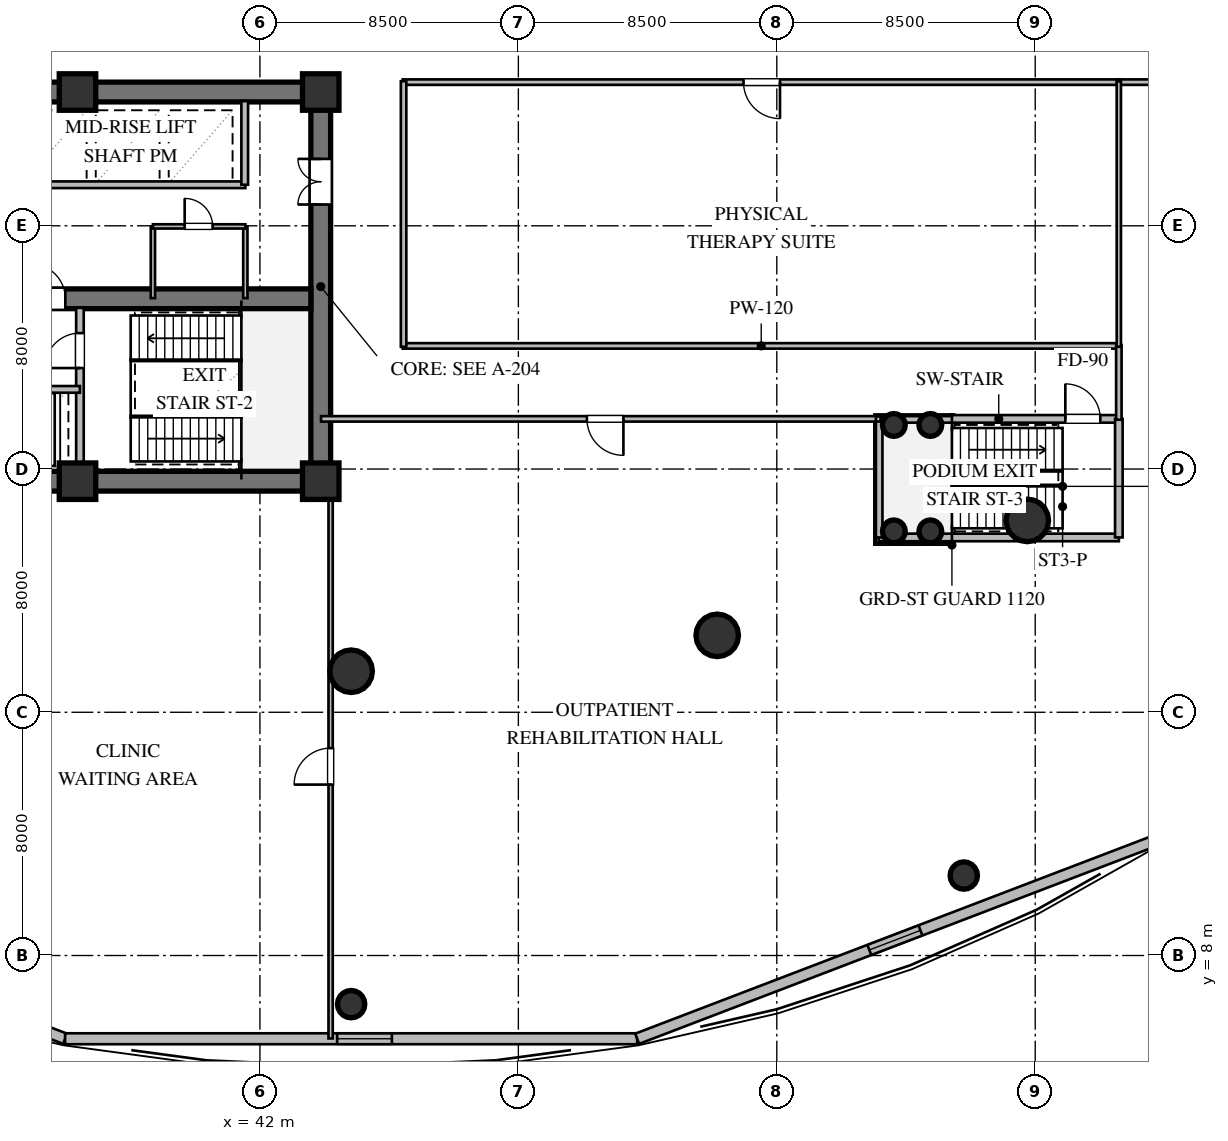
"""IFC4 building model, lengths in metres.
Left out: names, types, materials, properties, quantities, classifications, styles, units other than length and angle.
Written with IfcOpenShell. Run it as: python <this file> out.ifc"""

import sys

from ifc_helpers import new_model, si_unit, direction, frame, frame_2d, origin, origin_2d, place, context, subcontext, project, spatial, rectangle, circle, extrude, element, fill, save


model = new_model("IFC4")
c1 = context("Model", 3, precision=1e-05, world=origin(), true_north=direction((0.0, 1.0)))
c2 = subcontext(c1, "Body", "Model", "MODEL_VIEW")
j1 = project(units=[si_unit("LENGTHUNIT", "METRE"), si_unit("PLANEANGLEUNIT", "RADIAN")], contexts=[c1])
p1 = place(None, origin())
s1 = spatial("IfcSite", under=j1, at=p1, CompositionType="ELEMENT")
p2 = place(p1, origin())
s2 = spatial("IfcBuilding", under=s1, at=p2, CompositionType="ELEMENT")
p3 = place(p2, frame((0.0, 0.0, 14.4)))
s3 = spatial("IfcBuildingStorey", under=s2, at=p3, CompositionType="ELEMENT", Elevation=14.4)
for number, where, z_axis, x_axis in (
    (1, (21.675, 23.6, 0.0), (0.0, 0.0, 1.0), (1.0, 0.0, 0.0)),
    (2, (21.675, 36.4, 0.0), (0.0, 0.0, 1.0), (1.0, 0.0, 0.0)),
):
    element("IfcWall", number, at=place(p3, frame(where, z_axis=z_axis, x_axis=x_axis)), inside=s3, PredefinedType="SHEAR", context=c2, shape_type="SweptSolid", body=[
        extrude(rectangle(XDim=22.65, YDim=0.65, at=frame_2d((11.325, 0.0))), origin(), (0.0, 0.0, 1.0), 4.52),
    ])
p4 = place(p3, frame((44.0, 23.925, 0.0), z_axis=(0.0, 0.0, 1.0), x_axis=(0.0, 1.0, 0.0)))
e3 = element("IfcWall", 3, at=p4, inside=s3, PredefinedType="SHEAR", context=c2, shape_type="SweptSolid", body=[
    extrude(rectangle(XDim=12.15, YDim=0.65, at=frame_2d((6.075, 0.0))), origin(), (0.0, 0.0, 1.0), 4.52),
])
p5 = place(p4, frame((8.775, 0.0, 0.0)))
e4 = element("IfcOpeningElement", 4, at=p5, cuts=e3, PredefinedType="OPENING", context=c2, shape_type="SweptSolid", body=[
    extrude(rectangle(XDim=1.5, YDim=2.15, at=frame_2d((0.75, 1.075))), frame((0.0, 0.335, 0.0), z_axis=(0.0, -1.0, 0.0), x_axis=(1.0, 0.0, 0.0)), (0.0, 0.0, 1.0), 0.67),
])
p6 = place(p3, frame((22.325, 29.6, 0.0), z_axis=(0.0, 0.0, 1.0), x_axis=(1.0, 0.0, 0.0)))
e5 = element("IfcWall", 5, at=p6, inside=s3, PredefinedType="SHEAR", context=c2, shape_type="SweptSolid", body=[
    extrude(rectangle(XDim=21.35, YDim=0.65, at=frame_2d((10.675, 0.0))), origin(), (0.0, 0.0, 1.0), 4.52),
])
p7 = place(p6, frame((12.125, 0.0, 0.0)))
e6 = element("IfcOpeningElement", 6, at=p7, cuts=e5, PredefinedType="OPENING", context=c2, shape_type="SweptSolid", body=[
    extrude(rectangle(XDim=1.15, YDim=2.1, at=frame_2d((0.575, 1.05))), frame((0.0, 0.335, 0.0), z_axis=(0.0, -1.0, 0.0), x_axis=(1.0, 0.0, 0.0)), (0.0, 0.0, 1.0), 0.67),
])
for number, where, z_axis, x_axis in (
    (7, (36.0, 23.6, 0.0), (0.0, 0.0, 1.0), (1.0, 0.0, 0.0)),
    (8, (44.0, 23.6, 0.0), (0.0, 0.0, 1.0), (1.0, 0.0, 0.0)),
    (9, (44.0, 36.4, 0.0), (0.0, 0.0, 1.0), (1.0, 0.0, 0.0)),
    (10, (36.0, 36.4, 0.0), (0.0, 0.0, 1.0), (1.0, 0.0, 0.0)),
):
    element("IfcColumn", number, at=place(p3, frame(where, z_axis=z_axis, x_axis=x_axis)), inside=s3, PredefinedType="COLUMN", context=c2, shape_type="SweptSolid", body=[
        extrude(rectangle(XDim=1.2, YDim=1.2, at=origin_2d()), origin(), (0.0, 0.0, 1.0), 4.8),
    ])
for number, where, z_axis, x_axis in (
    (11, (45.0, 17.35, 0.0), (0.0, 0.0, 1.0), (1.0, 0.0, 0.0)),
    (12, (57.04, 18.53, 0.0), (0.0, 0.0, 1.0), (1.0, 0.0, 0.0)),
    (13, (67.24, 22.31, 0.0), (0.0, 0.0, 1.0), (1.0, 0.0, 0.0)),
):
    element("IfcColumn", number, at=place(p3, frame(where, z_axis=z_axis, x_axis=x_axis)), inside=s3, PredefinedType="COLUMN", context=c2, shape_type="SweptSolid", body=[
        extrude(circle(Radius=0.7, at=origin_2d()), origin(), (0.0, 0.0, 1.0), 4.8),
    ])
for number, where, z_axis, x_axis in (
    (14, (45.0, 6.4, 0.0), (0.0, 0.0, 1.0), (1.0, 0.0, 0.0)),
    (15, (65.15, 10.63, 0.0), (0.0, 0.0, 1.0), (1.0, 0.0, 0.0)),
):
    element("IfcColumn", number, at=place(p3, frame(where, z_axis=z_axis, x_axis=x_axis)), inside=s3, PredefinedType="COLUMN", context=c2, shape_type="SweptSolid", body=[
        extrude(circle(Radius=0.45, at=origin_2d()), origin(), (0.0, 0.0, 1.0), 4.8),
    ])
for number, where, z_axis, x_axis in (
    (16, (62.85, 21.95, 0.0), (0.0, 0.0, 1.0), (1.0, 0.0, 0.0)),
    (17, (62.85, 25.45, 0.0), (0.0, 0.0, 1.0), (1.0, 0.0, 0.0)),
    (18, (64.05, 21.95, 0.0), (0.0, 0.0, 1.0), (1.0, 0.0, 0.0)),
    (19, (64.05, 25.45, 0.0), (0.0, 0.0, 1.0), (1.0, 0.0, 0.0)),
):
    element("IfcColumn", number, at=place(p3, frame(where, z_axis=z_axis, x_axis=x_axis)), inside=s3, PredefinedType="COLUMN", context=c2, shape_type="SweptSolid", body=[
        extrude(circle(Radius=0.375, at=origin_2d()), origin(), (0.0, 0.0, 1.0), 4.8),
    ])
p8 = place(p3, frame((18.396, 11.839, 0.0), z_axis=(0.0, 0.0, 1.0), x_axis=(0.934012147289, -0.357241247221, 0.0)))
e20 = element("IfcWall", 20, at=p8, inside=s3, PredefinedType="STANDARD", context=c2, shape_type="SweptSolid", body=[
    extrude(rectangle(XDim=18.411, YDim=0.36, at=frame_2d((9.206, 0.0))), origin(), (0.0, 0.0, 1.0), 4.52),
])
p9 = place(p8, frame((8.305, 0.0, 1.05)))
e21 = element("IfcOpeningElement", 21, at=p9, cuts=e20, PredefinedType="OPENING", context=c2, shape_type="SweptSolid", body=[
    extrude(rectangle(XDim=1.8, YDim=1.7, at=frame_2d((0.9, 0.85))), frame((0.0, 0.19, 0.0), z_axis=(0.0, -1.0, 0.0), x_axis=(1.0, 0.0, 0.0)), (0.0, 0.0, 1.0), 0.38),
])
p10 = place(p3, frame((35.592, 5.262, 0.0), z_axis=(0.0, 0.0, 1.0), x_axis=(1.0, 0.0, 0.0)))
e22 = element("IfcWall", 22, at=p10, inside=s3, PredefinedType="STANDARD", context=c2, shape_type="SweptSolid", body=[
    extrude(rectangle(XDim=18.816, YDim=0.36, at=frame_2d((9.408, 0.0))), origin(), (0.0, 0.0, 1.0), 4.52),
])
p11 = place(p10, frame((8.948, 0.0, 1.05)))
e23 = element("IfcOpeningElement", 23, at=p11, cuts=e22, PredefinedType="OPENING", context=c2, shape_type="SweptSolid", body=[
    extrude(rectangle(XDim=1.8, YDim=1.7, at=frame_2d((0.9, 0.85))), frame((0.0, 0.19, 0.0), z_axis=(0.0, -1.0, 0.0), x_axis=(1.0, 0.0, 0.0)), (0.0, 0.0, 1.0), 0.38),
])
p12 = place(p3, frame((54.408, 5.262, 0.0), z_axis=(0.0, 0.0, 1.0), x_axis=(0.934014086565, 0.357236176917, 0.0)))
e24 = element("IfcWall", 24, at=p12, inside=s3, PredefinedType="STANDARD", context=c2, shape_type="SweptSolid", body=[
    extrude(rectangle(XDim=18.151, YDim=0.36, at=frame_2d((9.075, 0.0))), origin(), (0.0, 0.0, 1.0), 4.52),
])
p13 = place(p12, frame((8.175, 0.0, 1.05)))
e25 = element("IfcOpeningElement", 25, at=p13, cuts=e24, PredefinedType="OPENING", context=c2, shape_type="SweptSolid", body=[
    extrude(rectangle(XDim=1.8, YDim=1.7, at=frame_2d((0.9, 0.85))), frame((0.0, 0.19, 0.0), z_axis=(0.0, -1.0, 0.0), x_axis=(1.0, 0.0, 0.0)), (0.0, 0.0, 1.0), 0.38),
])
p14 = place(p3, frame((36.08, 23.9, 0.0), z_axis=(0.0, 0.0, 1.0), x_axis=(0.0, 1.0, 0.0)))
e26 = element("IfcWall", 26, at=p14, inside=s3, PredefinedType="SOLIDWALL", context=c2, shape_type="SweptSolid", body=[
    extrude(rectangle(XDim=5.4, YDim=0.25, at=frame_2d((2.7, 0.0))), origin(), (0.0, 0.0, 1.0), 4.52),
])
p15 = place(p14, frame((3.421, 0.0, 0.0)))
e27 = element("IfcOpeningElement", 27, at=p15, cuts=e26, PredefinedType="OPENING", context=c2, shape_type="SweptSolid", body=[
    extrude(rectangle(XDim=1.15, YDim=2.1, at=frame_2d((0.575, 1.05))), frame((0.0, 0.135, 0.0), z_axis=(0.0, -1.0, 0.0), x_axis=(1.0, 0.0, 0.0)), (0.0, 0.0, 1.0), 0.27),
])
p16 = place(p3, frame((29.92, 26.62, 0.0), z_axis=(0.0, 0.0, 1.0), x_axis=(1.0, 0.0, 0.0)))
e28 = element("IfcWall", 28, at=p16, inside=s3, PredefinedType="SOLIDWALL", context=c2, shape_type="SweptSolid", body=[
    extrude(rectangle(XDim=6.16, YDim=0.22, at=frame_2d((3.08, 0.0))), origin(), (0.0, 0.0, 1.0), 4.52),
])
p17 = place(p16, frame((0.99, 0.0, 0.0)))
e29 = element("IfcOpeningElement", 29, at=p17, cuts=e28, PredefinedType="OPENING", context=c2, shape_type="SweptSolid", body=[
    extrude(rectangle(XDim=1.1, YDim=2.1, at=frame_2d((0.55, 1.05))), frame((0.0, 0.12, 0.0), z_axis=(0.0, -1.0, 0.0), x_axis=(1.0, 0.0, 0.0)), (0.0, 0.0, 1.0), 0.24),
])
p18 = place(p16, frame((4.07, 0.0, 0.0)))
e30 = element("IfcOpeningElement", 30, at=p18, cuts=e28, PredefinedType="OPENING", context=c2, shape_type="SweptSolid", body=[
    extrude(rectangle(XDim=1.1, YDim=2.1, at=frame_2d((0.55, 1.05))), frame((0.0, 0.12, 0.0), z_axis=(0.0, -1.0, 0.0), x_axis=(1.0, 0.0, 0.0)), (0.0, 0.0, 1.0), 0.24),
])
p19 = place(p3, frame((33.98, 33.35, 0.0), z_axis=(0.0, 0.0, 1.0), x_axis=(1.0, 0.0, 0.0)))
e31 = element("IfcWall", 31, at=p19, inside=s3, PredefinedType="SOLIDWALL", context=c2, shape_type="SweptSolid", body=[
    extrude(rectangle(XDim=7.54, YDim=0.22, at=frame_2d((3.77, 0.0))), origin(), (0.0, 0.0, 1.0), 4.52),
])
p20 = place(p3, frame((41.5, 33.35, 0.0), z_axis=(0.0, 0.0, 1.0), x_axis=(0.0, 1.0, 0.0)))
e32 = element("IfcWall", 32, at=p20, inside=s3, PredefinedType="SOLIDWALL", context=c2, shape_type="SweptSolid", body=[
    extrude(rectangle(XDim=2.75, YDim=0.22, at=frame_2d((1.375, 0.0))), origin(), (0.0, 0.0, 1.0), 4.52),
])
p21 = place(p3, frame((38.48, 29.62, 0.0), z_axis=(0.0, 0.0, 1.0), x_axis=(0.0, 1.0, 0.0)))
e33 = element("IfcWall", 33, at=p21, inside=s3, PredefinedType="PARTITIONING", context=c2, shape_type="SweptSolid", body=[
    extrude(rectangle(XDim=2.36, YDim=0.14, at=frame_2d((1.18, 0.0))), origin(), (0.0, 0.0, 1.0), 4.52),
])
p22 = place(p3, frame((41.52, 29.62, 0.0), z_axis=(0.0, 0.0, 1.0), x_axis=(0.0, 1.0, 0.0)))
e34 = element("IfcWall", 34, at=p22, inside=s3, PredefinedType="PARTITIONING", context=c2, shape_type="SweptSolid", body=[
    extrude(rectangle(XDim=2.36, YDim=0.14, at=frame_2d((1.18, 0.0))), origin(), (0.0, 0.0, 1.0), 1.887),
])
p23 = place(p3, frame((38.48, 31.98, 0.0), z_axis=(0.0, 0.0, 1.0), x_axis=(1.0, 0.0, 0.0)))
e35 = element("IfcWall", 35, at=p23, inside=s3, PredefinedType="PARTITIONING", context=c2, shape_type="SweptSolid", body=[
    extrude(rectangle(XDim=3.04, YDim=0.14, at=frame_2d((1.52, 0.0))), origin(), (0.0, 0.0, 1.0), 4.52),
])
p24 = place(p23, frame((1.045, 0.0, 0.0)))
e36 = element("IfcOpeningElement", 36, at=p24, cuts=e35, PredefinedType="OPENING", context=c2, shape_type="SweptSolid", body=[
    extrude(rectangle(XDim=0.92, YDim=2.1, at=frame_2d((0.46, 1.05))), frame((0.0, 0.08, 0.0), z_axis=(0.0, -1.0, 0.0), x_axis=(1.0, 0.0, 0.0)), (0.0, 0.0, 1.0), 0.16),
])
p25 = place(p3, frame((62.35, 25.65, 0.0), z_axis=(0.0, 0.0, 1.0), x_axis=(1.0, 0.0, 0.0)))
e37 = element("IfcWall", 37, at=p25, inside=s3, PredefinedType="SOLIDWALL", context=c2, shape_type="SweptSolid", body=[
    extrude(rectangle(XDim=7.9, YDim=0.25, at=frame_2d((3.95, 0.0))), origin(), (0.0, 0.0, 1.0), 4.52),
])
p26 = place(p25, frame((6.14, 0.0, 0.0)))
e38 = element("IfcOpeningElement", 38, at=p26, cuts=e37, PredefinedType="OPENING", context=c2, shape_type="SweptSolid", body=[
    extrude(rectangle(XDim=1.15, YDim=2.1, at=frame_2d((0.575, 1.05))), frame((0.0, 0.135, 0.0), z_axis=(0.0, -1.0, 0.0), x_axis=(1.0, 0.0, 0.0)), (0.0, 0.0, 1.0), 0.27),
])
p27 = place(p3, frame((62.35, 21.75, 0.0), z_axis=(0.0, 0.0, 1.0), x_axis=(1.0, 0.0, 0.0)))
e39 = element("IfcWall", 39, at=p27, inside=s3, PredefinedType="SOLIDWALL", context=c2, shape_type="SweptSolid", body=[
    extrude(rectangle(XDim=7.9, YDim=0.25, at=frame_2d((3.95, 0.0))), origin(), (0.0, 0.0, 1.0), 4.52),
])
p28 = place(p3, frame((62.35, 21.75, 0.0), z_axis=(0.0, 0.0, 1.0), x_axis=(0.0, 1.0, 0.0)))
e40 = element("IfcWall", 40, at=p28, inside=s3, PredefinedType="SOLIDWALL", context=c2, shape_type="SweptSolid", body=[
    extrude(rectangle(XDim=3.9, YDim=0.25, at=frame_2d((1.95, 0.0))), origin(), (0.0, 0.0, 1.0), 1.887),
])
p29 = place(p3, frame((70.25, 21.75, 0.0), z_axis=(0.0, 0.0, 1.0), x_axis=(0.0, 1.0, 0.0)))
e41 = element("IfcWall", 41, at=p29, inside=s3, PredefinedType="SOLIDWALL", context=c2, shape_type="SweptSolid", body=[
    extrude(rectangle(XDim=3.9, YDim=0.25, at=frame_2d((1.95, 0.0))), origin(), (0.0, 0.0, 1.0), 4.52),
])
p30 = place(p3, frame((62.415, 25.65, 0.0), z_axis=(0.0, 0.0, 1.0), x_axis=(-1.0, 0.0, 0.0)))
e42 = element("IfcWall", 42, at=p30, inside=s3, PredefinedType="PARTITIONING", context=c2, shape_type="SweptSolid", body=[
    extrude(rectangle(XDim=18.405, YDim=0.18, at=frame_2d((9.203, 0.0))), origin(), (0.0, 0.0, 1.0), 4.05),
])
p31 = place(p30, frame((8.46, 0.0, 0.0)))
e43 = element("IfcOpeningElement", 43, at=p31, cuts=e42, PredefinedType="OPENING", context=c2, shape_type="SweptSolid", body=[
    extrude(rectangle(XDim=1.2, YDim=2.15, at=frame_2d((0.6, 1.075))), frame((0.0, 0.1, 0.0), z_axis=(0.0, -1.0, 0.0), x_axis=(1.0, 0.0, 0.0)), (0.0, 0.0, 1.0), 0.2),
])
p32 = place(p3, frame((70.315, 36.725, 0.0), z_axis=(0.0, 0.0, 1.0), x_axis=(-1.0, 0.0, 0.0)))
e44 = element("IfcWall", 44, at=p32, inside=s3, PredefinedType="PARTITIONING", context=c2, shape_type="SweptSolid", body=[
    extrude(rectangle(XDim=23.62, YDim=0.18, at=frame_2d((11.81, 0.0))), origin(), (0.0, 0.0, 1.0), 4.05),
])
p33 = place(p32, frame((11.21, 0.0, 0.0)))
e45 = element("IfcOpeningElement", 45, at=p33, cuts=e44, PredefinedType="OPENING", context=c2, shape_type="SweptSolid", body=[
    extrude(rectangle(XDim=1.2, YDim=2.15, at=frame_2d((0.6, 1.075))), frame((0.0, 0.1, 0.0), z_axis=(0.0, -1.0, 0.0), x_axis=(1.0, 0.0, 0.0)), (0.0, 0.0, 1.0), 0.2),
])
p34 = place(p3, frame((46.695, 28.05, 0.0), z_axis=(0.0, 0.0, 1.0), x_axis=(1.0, 0.0, 0.0)))
e46 = element("IfcWall", 46, at=p34, inside=s3, PredefinedType="PARTITIONING", context=c2, shape_type="SweptSolid", body=[
    extrude(rectangle(XDim=23.585, YDim=0.18, at=frame_2d((11.792, 0.0))), origin(), (0.0, 0.0, 1.0), 4.05),
])
p35 = place(p3, frame((46.725, 36.755, 0.0), z_axis=(0.0, 0.0, 1.0), x_axis=(0.0, -1.0, 0.0)))
e47 = element("IfcWall", 47, at=p35, inside=s3, PredefinedType="PARTITIONING", context=c2, shape_type="SweptSolid", body=[
    extrude(rectangle(XDim=8.735, YDim=0.18, at=frame_2d((4.367, 0.0))), origin(), (0.0, 0.0, 1.0), 4.52),
])
p36 = place(p3, frame((78.03, 36.725, 0.0), z_axis=(0.0, 0.0, 1.0), x_axis=(-1.0, 0.0, 0.0)))
e48 = element("IfcWall", 48, at=p36, inside=s3, PredefinedType="PARTITIONING", context=c2, shape_type="SweptSolid", body=[
    extrude(rectangle(XDim=7.845, YDim=0.18, at=frame_2d((3.922, 0.0))), origin(), (0.0, 0.0, 1.0), 4.52),
])
p37 = place(p36, frame((3.322, 0.0, 0.0)))
e49 = element("IfcOpeningElement", 49, at=p37, cuts=e48, PredefinedType="OPENING", context=c2, shape_type="SweptSolid", body=[
    extrude(rectangle(XDim=1.2, YDim=2.15, at=frame_2d((0.6, 1.075))), frame((0.0, 0.1, 0.0), z_axis=(0.0, -1.0, 0.0), x_axis=(1.0, 0.0, 0.0)), (0.0, 0.0, 1.0), 0.2),
])
p38 = place(p3, frame((70.25, 28.08, 0.0), z_axis=(0.0, 0.0, 1.0), x_axis=(0.0, -1.0, 0.0)))
e50 = element("IfcWall", 50, at=p38, inside=s3, PredefinedType="PARTITIONING", context=c2, shape_type="SweptSolid", body=[
    extrude(rectangle(XDim=2.46, YDim=0.18, at=frame_2d((1.23, 0.0))), origin(), (0.0, 0.0, 1.0), 4.52),
])
p39 = place(p3, frame((44.325, 5.272, 0.0), z_axis=(0.0, 0.0, 1.0), x_axis=(0.0, 1.0, 0.0)))
e51 = element("IfcWall", 51, at=p39, inside=s3, PredefinedType="PARTITIONING", context=c2, shape_type="SweptSolid", body=[
    extrude(rectangle(XDim=18.318, YDim=0.14, at=frame_2d((9.159, 0.0))), origin(), (0.0, 0.0, 1.0), 3.66),
])
p40 = place(p39, frame((8.349, 0.0, 0.0)))
e52 = element("IfcOpeningElement", 52, at=p40, cuts=e51, PredefinedType="OPENING", context=c2, shape_type="SweptSolid", body=[
    extrude(rectangle(XDim=1.2, YDim=2.15, at=frame_2d((0.6, 1.075))), frame((0.0, 0.08, 0.0), z_axis=(0.0, -1.0, 0.0), x_axis=(1.0, 0.0, 0.0)), (0.0, 0.0, 1.0), 0.16),
])
p41 = place(p3, frame((70.25, 36.755, 0.0), z_axis=(0.0, 0.0, 1.0), x_axis=(0.0, -1.0, 0.0)))
e53 = element("IfcWall", 53, at=p41, inside=s3, PredefinedType="PARTITIONING", context=c2, shape_type="SweptSolid", body=[
    extrude(rectangle(XDim=8.735, YDim=0.14, at=frame_2d((4.367, 0.0))), origin(), (0.0, 0.0, 1.0), 4.52),
])
p42 = place(p11, origin())
e54 = element("IfcWindow", 54, at=p42, inside=s3, PartitioningType="SINGLE_PANEL", PredefinedType="WINDOW", context=c2, shape_type="SweptSolid", body=[
    extrude(rectangle(XDim=1.8, YDim=1.7, at=frame_2d((0.9, 0.85))), frame((0.0, 0.03, 0.0), z_axis=(0.0, -1.0, 0.0), x_axis=(1.0, 0.0, 0.0)), (0.0, 0.0, 1.0), 0.06),
])
fill(e23, e54)
p43 = place(p13, origin())
e55 = element("IfcWindow", 55, at=p43, inside=s3, PartitioningType="SINGLE_PANEL", PredefinedType="WINDOW", context=c2, shape_type="SweptSolid", body=[
    extrude(rectangle(XDim=1.8, YDim=1.7, at=frame_2d((0.9, 0.85))), frame((0.0, 0.03, 0.0), z_axis=(0.0, -1.0, 0.0), x_axis=(1.0, 0.0, 0.0)), (0.0, 0.0, 1.0), 0.06),
])
fill(e25, e55)
p44 = place(p15, origin())
e56 = element("IfcDoor", 56, at=p44, inside=s3, OperationType="SINGLE_SWING_LEFT", PredefinedType="DOOR", context=c2, shape_type="SweptSolid", body=[
    extrude(rectangle(XDim=1.15, YDim=2.1, at=frame_2d((0.575, 1.05))), frame((0.0, 0.025, 0.0), z_axis=(0.0, -1.0, 0.0), x_axis=(1.0, 0.0, 0.0)), (0.0, 0.0, 1.0), 0.05),
])
fill(e27, e56)
p45 = place(p7, origin())
e57 = element("IfcDoor", 57, at=p45, inside=s3, OperationType="SINGLE_SWING_LEFT", PredefinedType="DOOR", context=c2, shape_type="SweptSolid", body=[
    extrude(rectangle(XDim=1.15, YDim=2.1, at=frame_2d((0.575, 1.05))), frame((0.0, 0.025, 0.0), z_axis=(0.0, -1.0, 0.0), x_axis=(1.0, 0.0, 0.0)), (0.0, 0.0, 1.0), 0.05),
])
fill(e6, e57)
p46 = place(p5, origin())
e58 = element("IfcDoor", 58, at=p46, inside=s3, OperationType="DOUBLE_DOOR_SINGLE_SWING", PredefinedType="DOOR", context=c2, shape_type="SweptSolid", body=[
    extrude(rectangle(XDim=1.5, YDim=2.15, at=frame_2d((0.75, 1.075))), frame((0.0, 0.025, 0.0), z_axis=(0.0, -1.0, 0.0), x_axis=(1.0, 0.0, 0.0)), (0.0, 0.0, 1.0), 0.05),
])
fill(e4, e58)
p47 = place(p24, origin())
e59 = element("IfcDoor", 59, at=p47, inside=s3, OperationType="SINGLE_SWING_LEFT", PredefinedType="DOOR", context=c2, shape_type="SweptSolid", body=[
    extrude(rectangle(XDim=0.92, YDim=2.1, at=frame_2d((0.46, 1.05))), frame((0.0, 0.025, 0.0), z_axis=(0.0, -1.0, 0.0), x_axis=(1.0, 0.0, 0.0)), (0.0, 0.0, 1.0), 0.05),
])
fill(e36, e59)
p48 = place(p26, origin())
e60 = element("IfcDoor", 60, at=p48, inside=s3, OperationType="SINGLE_SWING_LEFT", PredefinedType="DOOR", context=c2, shape_type="SweptSolid", body=[
    extrude(rectangle(XDim=1.15, YDim=2.1, at=frame_2d((0.575, 1.05))), frame((0.0, 0.025, 0.0), z_axis=(0.0, -1.0, 0.0), x_axis=(1.0, 0.0, 0.0)), (0.0, 0.0, 1.0), 0.05),
])
fill(e38, e60)
p49 = place(p31, origin())
e61 = element("IfcDoor", 61, at=p49, inside=s3, OperationType="SINGLE_SWING_LEFT", PredefinedType="DOOR", context=c2, shape_type="SweptSolid", body=[
    extrude(rectangle(XDim=1.2, YDim=2.15, at=frame_2d((0.6, 1.075))), frame((0.0, 0.025, 0.0), z_axis=(0.0, -1.0, 0.0), x_axis=(1.0, 0.0, 0.0)), (0.0, 0.0, 1.0), 0.05),
])
fill(e43, e61)
p50 = place(p33, origin())
e62 = element("IfcDoor", 62, at=p50, inside=s3, OperationType="SINGLE_SWING_LEFT", PredefinedType="DOOR", context=c2, shape_type="SweptSolid", body=[
    extrude(rectangle(XDim=1.2, YDim=2.15, at=frame_2d((0.6, 1.075))), frame((0.0, 0.025, 0.0), z_axis=(0.0, -1.0, 0.0), x_axis=(1.0, 0.0, 0.0)), (0.0, 0.0, 1.0), 0.05),
])
fill(e45, e62)
p51 = place(p40, origin())
e63 = element("IfcDoor", 63, at=p51, inside=s3, OperationType="SINGLE_SWING_LEFT", PredefinedType="DOOR", context=c2, shape_type="SweptSolid", body=[
    extrude(rectangle(XDim=1.2, YDim=2.15, at=frame_2d((0.6, 1.075))), frame((0.0, 0.025, 0.0), z_axis=(0.0, -1.0, 0.0), x_axis=(1.0, 0.0, 0.0)), (0.0, 0.0, 1.0), 0.05),
])
fill(e52, e63)
save(model, sys.argv[1])
